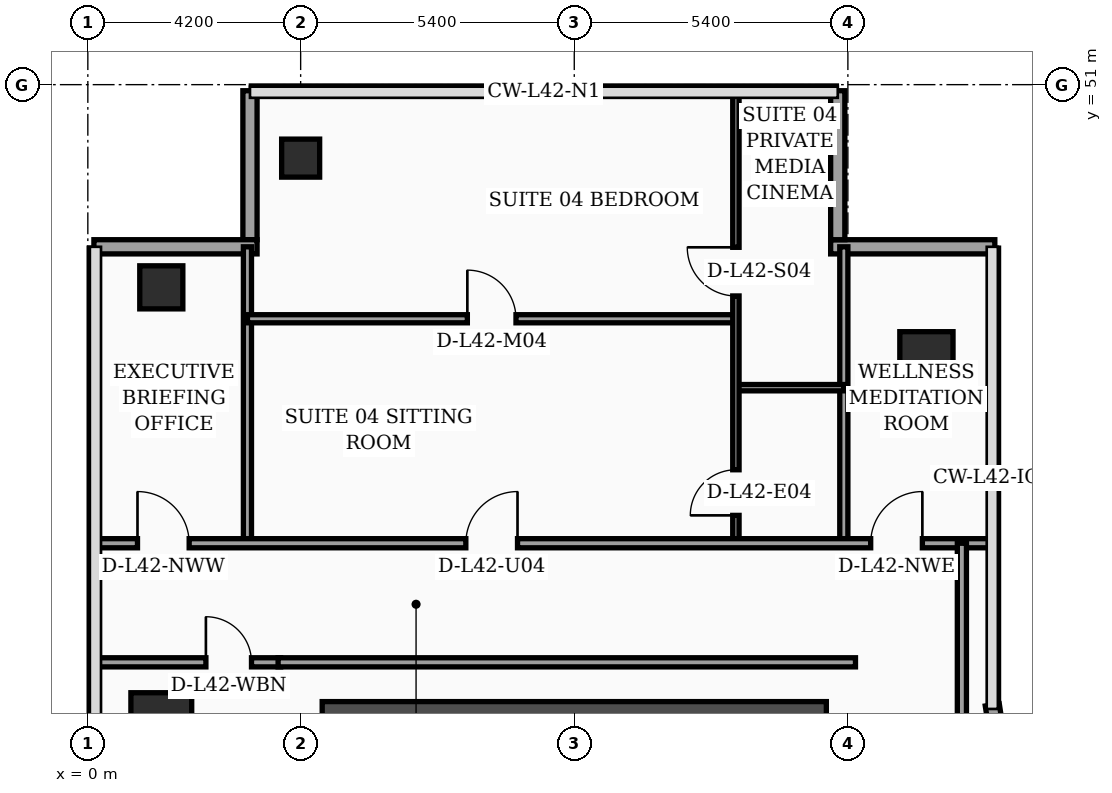
"""IFC4 building model, lengths in metres.
Left out: names, types, materials, properties, quantities, classifications, styles, units other than length and angle.
Written with IfcOpenShell. Run it as: python <this file> out.ifc"""

import sys

from ifc_helpers import new_model, si_unit, direction, frame, frame_2d, origin, origin_2d, place, context, subcontext, project, spatial, rectangle, hollow_rectangle, extrude, element, fill, save


model = new_model("IFC4")
c1 = context("Model", 3, precision=1e-05, world=origin(), true_north=direction((0.0, 1.0)))
c2 = subcontext(c1, "Body", "Model", "MODEL_VIEW")
j1 = project(units=[si_unit("LENGTHUNIT", "METRE"), si_unit("PLANEANGLEUNIT", "RADIAN")], contexts=[c1])
p1 = place(None, origin())
s1 = spatial("IfcSite", under=j1, at=p1, CompositionType="ELEMENT")
p2 = place(p1, origin())
s2 = spatial("IfcBuilding", under=s1, at=p2, CompositionType="ELEMENT")
p3 = place(p2, frame((0.0, 0.0, 171.3)))
s3 = spatial("IfcBuildingStorey", under=s2, at=p3, CompositionType="ELEMENT", Elevation=171.3)
p4 = place(p3, frame((4.625, 38.4, 0.0), z_axis=(0.0, 0.0, 1.0), x_axis=(1.0, 0.0, 0.0)))
e1 = element("IfcWall", 1, at=p4, inside=s3, PredefinedType="SHEAR", context=c2, shape_type="SweptSolid", body=[
    extrude(rectangle(XDim=9.95, YDim=0.85, at=frame_2d((4.975, 0.0))), origin(), (0.0, 0.0, 1.0), 3.56),
])
p5 = place(p3, frame((1.45, 38.4, 0.0), z_axis=(0.0, 0.0, 1.0), x_axis=(1.0, 0.0, 0.0)))
e2 = element("IfcColumn", 2, at=p5, inside=s3, PredefinedType="COLUMN", context=c2, shape_type="SweptSolid", body=[
    extrude(rectangle(XDim=1.2, YDim=1.2, at=origin_2d()), origin(), (0.0, 0.0, 1.0), 3.56),
])
p6 = place(p3, frame((1.45, 47.0, 0.0), z_axis=(0.0, 0.0, 1.0), x_axis=(1.0, 0.0, 0.0)))
e3 = element("IfcColumn", 3, at=p6, inside=s3, PredefinedType="COLUMN", context=c2, shape_type="SweptSolid", body=[
    extrude(hollow_rectangle(XDim=0.85, YDim=0.85, WallThickness=0.036, at=origin_2d()), origin(), (0.0, 0.0, 1.0), 3.56),
])
p7 = place(p3, frame((4.2, 49.55, 0.0), z_axis=(0.0, 0.0, 1.0), x_axis=(1.0, 0.0, 0.0)))
e4 = element("IfcColumn", 4, at=p7, inside=s3, PredefinedType="COLUMN", context=c2, shape_type="SweptSolid", body=[
    extrude(hollow_rectangle(XDim=0.75, YDim=0.75, WallThickness=0.032, at=origin_2d()), origin(), (0.0, 0.0, 1.0), 3.56),
])
p8 = place(p3, frame((16.55, 45.6, 0.0), z_axis=(0.0, 0.0, 1.0), x_axis=(1.0, 0.0, 0.0)))
e5 = element("IfcColumn", 5, at=p8, inside=s3, PredefinedType="COLUMN", context=c2, shape_type="SweptSolid", body=[
    extrude(rectangle(XDim=1.05, YDim=1.05, at=origin_2d()), origin(), (0.0, 0.0, 1.0), 3.56),
])
p9 = place(p3, frame((17.962, 38.03, 0.0), z_axis=(0.0, 0.0, 1.0), x_axis=(-0.15141125477, 0.988470855377, 0.0)))
e6 = element("IfcWall", 6, at=p9, inside=s3, PredefinedType="SOLIDWALL", context=c2, shape_type="SweptSolid", body=[
    extrude(rectangle(XDim=0.739, YDim=0.28, at=frame_2d((0.369, 0.0))), origin(), (0.0, 0.0, 1.0), 3.56),
])
p10 = place(p3, frame((17.9, 47.8, 0.0), z_axis=(0.0, 0.0, 1.0), x_axis=(-1.0, 0.0, 0.0)))
e7 = element("IfcWall", 7, at=p10, inside=s3, PredefinedType="SOLIDWALL", context=c2, shape_type="SweptSolid", body=[
    extrude(rectangle(XDim=3.24, YDim=0.28, at=frame_2d((1.62, 0.0))), origin(), (0.0, 0.0, 1.0), 3.56),
])
p11 = place(p3, frame((14.8, 47.94, 0.0), z_axis=(0.0, 0.0, 1.0), x_axis=(0.0, 1.0, 0.0)))
e8 = element("IfcWall", 8, at=p11, inside=s3, PredefinedType="SOLIDWALL", context=c2, shape_type="SweptSolid", body=[
    extrude(rectangle(XDim=2.94, YDim=0.28, at=frame_2d((1.47, 0.0))), origin(), (0.0, 0.0, 1.0), 3.56),
])
p12 = place(p3, frame((3.2, 50.88, 0.0), z_axis=(0.0, 0.0, 1.0), x_axis=(0.0, -1.0, 0.0)))
e9 = element("IfcWall", 9, at=p12, inside=s3, PredefinedType="SOLIDWALL", context=c2, shape_type="SweptSolid", body=[
    extrude(rectangle(XDim=2.94, YDim=0.28, at=frame_2d((1.47, 0.0))), origin(), (0.0, 0.0, 1.0), 3.04),
])
p13 = place(p3, frame((3.34, 47.8, 0.0), z_axis=(0.0, 0.0, 1.0), x_axis=(-1.0, 0.0, 0.0)))
e10 = element("IfcWall", 10, at=p13, inside=s3, PredefinedType="SOLIDWALL", context=c2, shape_type="SweptSolid", body=[
    extrude(rectangle(XDim=3.22, YDim=0.28, at=frame_2d((1.61, 0.0))), origin(), (0.0, 0.0, 1.0), 3.04),
])
p14 = place(p3, frame((0.08, 39.6, 0.0), z_axis=(0.0, 0.0, 1.0), x_axis=(1.0, 0.0, 0.0)))
e11 = element("IfcWall", 11, at=p14, inside=s3, PredefinedType="PARTITIONING", context=c2, shape_type="SweptSolid", body=[
    extrude(rectangle(XDim=3.725, YDim=0.18, at=frame_2d((1.862, 0.0))), origin(), (0.0, 0.0, 1.0), 2.94),
])
p15 = place(p14, frame((2.25, 0.0, 0.0)))
e12 = element("IfcOpeningElement", 12, at=p15, cuts=e11, PredefinedType="OPENING", context=c2, shape_type="SweptSolid", body=[
    extrude(rectangle(XDim=0.9, YDim=2.15, at=frame_2d((0.45, 1.075))), frame((0.0, 0.1, 0.0), z_axis=(0.0, -1.0, 0.0), x_axis=(1.0, 0.0, 0.0)), (0.0, 0.0, 1.0), 0.2),
])
p16 = place(p3, frame((3.15, 41.95, 0.0), z_axis=(0.0, 0.0, 1.0), x_axis=(0.0, 1.0, 0.0)))
e13 = element("IfcWall", 13, at=p16, inside=s3, PredefinedType="PARTITIONING", context=c2, shape_type="SweptSolid", body=[
    extrude(rectangle(XDim=5.85, YDim=0.16, at=frame_2d((2.925, 0.0))), origin(), (0.0, 0.0, 1.0), 3.14),
])
p17 = place(p3, frame((14.92, 41.95, 0.0), z_axis=(0.0, 0.0, 1.0), x_axis=(0.0, 1.0, 0.0)))
e14 = element("IfcWall", 14, at=p17, inside=s3, PredefinedType="PARTITIONING", context=c2, shape_type="SweptSolid", body=[
    extrude(rectangle(XDim=5.85, YDim=0.16, at=frame_2d((2.925, 0.0))), origin(), (0.0, 0.0, 1.0), 3.04),
])
p18 = place(p3, frame((12.79, 45.02, 0.0), z_axis=(0.0, 0.0, 1.0), x_axis=(1.0, 0.0, 0.0)))
e15 = element("IfcWall", 15, at=p18, inside=s3, PredefinedType="PARTITIONING", context=c2, shape_type="SweptSolid", body=[
    extrude(rectangle(XDim=2.13, YDim=0.125, at=frame_2d((1.065, 0.0))), origin(), (0.0, 0.0, 1.0), 3.56),
])
p19 = place(p3, frame((3.15, 46.38, 0.0), z_axis=(0.0, 0.0, 1.0), x_axis=(1.0, 0.0, 0.0)))
e16 = element("IfcWall", 16, at=p19, inside=s3, PredefinedType="PARTITIONING", context=c2, shape_type="SweptSolid", body=[
    extrude(rectangle(XDim=9.64, YDim=0.16, at=frame_2d((4.82, 0.0))), origin(), (0.0, 0.0, 1.0), 2.94),
])
p20 = place(p19, frame((4.34, 0.0, 0.0)))
e17 = element("IfcOpeningElement", 17, at=p20, cuts=e16, PredefinedType="OPENING", context=c2, shape_type="SweptSolid", body=[
    extrude(rectangle(XDim=0.96, YDim=2.2, at=frame_2d((0.48, 1.1))), frame((0.0, 0.09, 0.0), z_axis=(0.0, -1.0, 0.0), x_axis=(1.0, 0.0, 0.0)), (0.0, 0.0, 1.0), 0.18),
])
p21 = place(p3, frame((12.79, 41.95, 0.0), z_axis=(0.0, 0.0, 1.0), x_axis=(0.0, 1.0, 0.0)))
e18 = element("IfcWall", 18, at=p21, inside=s3, PredefinedType="PARTITIONING", context=c2, shape_type="SweptSolid", body=[
    extrude(rectangle(XDim=8.99, YDim=0.125, at=frame_2d((4.495, 0.0))), origin(), (0.0, 0.0, 1.0), 3.04),
])
p22 = place(p21, frame((0.55, 0.0, 0.0)))
e19 = element("IfcOpeningElement", 19, at=p22, cuts=e18, PredefinedType="OPENING", context=c2, shape_type="SweptSolid", body=[
    extrude(rectangle(XDim=0.9, YDim=2.15, at=frame_2d((0.45, 1.075))), frame((0.0, 0.073, 0.0), z_axis=(0.0, -1.0, 0.0), x_axis=(1.0, 0.0, 0.0)), (0.0, 0.0, 1.0), 0.145),
])
p23 = place(p21, frame((4.88, 0.0, 0.0)))
e20 = element("IfcOpeningElement", 20, at=p23, cuts=e18, PredefinedType="OPENING", context=c2, shape_type="SweptSolid", body=[
    extrude(rectangle(XDim=0.96, YDim=2.2, at=frame_2d((0.48, 1.1))), frame((0.0, 0.073, 0.0), z_axis=(0.0, -1.0, 0.0), x_axis=(1.0, 0.0, 0.0)), (0.0, 0.0, 1.0), 0.145),
])
p24 = place(p3, frame((0.08, 41.95, 0.0), z_axis=(0.0, 0.0, 1.0), x_axis=(1.0, 0.0, 0.0)))
e21 = element("IfcWall", 21, at=p24, inside=s3, PredefinedType="PARTITIONING", context=c2, shape_type="SweptSolid", body=[
    extrude(rectangle(XDim=17.77, YDim=0.18, at=frame_2d((8.885, 0.0))), origin(), (0.0, 0.0, 1.0), 2.94),
])
p25 = place(p24, frame((0.9, 0.0, 0.0)))
e22 = element("IfcOpeningElement", 22, at=p25, cuts=e21, PredefinedType="OPENING", context=c2, shape_type="SweptSolid", body=[
    extrude(rectangle(XDim=1.02, YDim=2.2, at=frame_2d((0.51, 1.1))), frame((0.0, 0.1, 0.0), z_axis=(0.0, -1.0, 0.0), x_axis=(1.0, 0.0, 0.0)), (0.0, 0.0, 1.0), 0.2),
])
p26 = place(p24, frame((7.38, 0.0, 0.0)))
e23 = element("IfcOpeningElement", 23, at=p26, cuts=e21, PredefinedType="OPENING", context=c2, shape_type="SweptSolid", body=[
    extrude(rectangle(XDim=1.02, YDim=2.2, at=frame_2d((0.51, 1.1))), frame((0.0, 0.1, 0.0), z_axis=(0.0, -1.0, 0.0), x_axis=(1.0, 0.0, 0.0)), (0.0, 0.0, 1.0), 0.2),
])
p27 = place(p24, frame((15.37, 0.0, 0.0)))
e24 = element("IfcOpeningElement", 24, at=p27, cuts=e21, PredefinedType="OPENING", context=c2, shape_type="SweptSolid", body=[
    extrude(rectangle(XDim=1.02, YDim=2.2, at=frame_2d((0.51, 1.1))), frame((0.0, 0.1, 0.0), z_axis=(0.0, -1.0, 0.0), x_axis=(1.0, 0.0, 0.0)), (0.0, 0.0, 1.0), 0.2),
])
p28 = place(p3, frame((17.25, 24.3, 0.0), z_axis=(0.0, 0.0, 1.0), x_axis=(0.0, 1.0, 0.0)))
e25 = element("IfcWall", 25, at=p28, inside=s3, PredefinedType="PARTITIONING", context=c2, shape_type="SweptSolid", body=[
    extrude(rectangle(XDim=17.65, YDim=0.18, at=frame_2d((8.825, 0.0))), origin(), (0.0, 0.0, 1.0), 2.94),
])
p29 = place(p3, frame((3.755, 39.6, 0.0), z_axis=(0.0, 0.0, 1.0), x_axis=(1.0, 0.0, 0.0)))
e26 = element("IfcWall", 26, at=p29, inside=s3, PredefinedType="PARTITIONING", context=c2, shape_type="SweptSolid", body=[
    extrude(rectangle(XDim=11.395, YDim=0.18, at=frame_2d((5.698, 0.0))), origin(), (0.0, 0.0, 1.0), 2.94),
])
p30 = place(p15, origin())
e27 = element("IfcDoor", 27, at=p30, inside=s3, OperationType="SINGLE_SWING_LEFT", PredefinedType="DOOR", context=c2, shape_type="SweptSolid", body=[
    extrude(rectangle(XDim=0.9, YDim=2.15, at=frame_2d((0.45, 1.075))), frame((0.0, 0.025, 0.0), z_axis=(0.0, -1.0, 0.0), x_axis=(1.0, 0.0, 0.0)), (0.0, 0.0, 1.0), 0.05),
])
fill(e12, e27)
p31 = place(p20, origin())
e28 = element("IfcDoor", 28, at=p31, inside=s3, OperationType="SINGLE_SWING_LEFT", PredefinedType="DOOR", context=c2, shape_type="SweptSolid", body=[
    extrude(rectangle(XDim=0.96, YDim=2.2, at=frame_2d((0.48, 1.1))), frame((0.0, 0.025, 0.0), z_axis=(0.0, -1.0, 0.0), x_axis=(1.0, 0.0, 0.0)), (0.0, 0.0, 1.0), 0.05),
])
fill(e17, e28)
p32 = place(p22, origin())
e29 = element("IfcDoor", 29, at=p32, inside=s3, OperationType="SINGLE_SWING_LEFT", PredefinedType="DOOR", context=c2, shape_type="SweptSolid", body=[
    extrude(rectangle(XDim=0.9, YDim=2.15, at=frame_2d((0.45, 1.075))), frame((0.0, 0.025, 0.0), z_axis=(0.0, -1.0, 0.0), x_axis=(1.0, 0.0, 0.0)), (0.0, 0.0, 1.0), 0.05),
])
fill(e19, e29)
p33 = place(p23, origin())
e30 = element("IfcDoor", 30, at=p33, inside=s3, OperationType="SINGLE_SWING_RIGHT", PredefinedType="DOOR", context=c2, shape_type="SweptSolid", body=[
    extrude(rectangle(XDim=0.96, YDim=2.2, at=frame_2d((0.48, 1.1))), frame((0.0, 0.025, 0.0), z_axis=(0.0, -1.0, 0.0), x_axis=(1.0, 0.0, 0.0)), (0.0, 0.0, 1.0), 0.05),
])
fill(e20, e30)
p34 = place(p25, origin())
e31 = element("IfcDoor", 31, at=p34, inside=s3, OperationType="SINGLE_SWING_LEFT", PredefinedType="DOOR", context=c2, shape_type="SweptSolid", body=[
    extrude(rectangle(XDim=1.02, YDim=2.2, at=frame_2d((0.51, 1.1))), frame((0.0, 0.025, 0.0), z_axis=(0.0, -1.0, 0.0), x_axis=(1.0, 0.0, 0.0)), (0.0, 0.0, 1.0), 0.05),
])
fill(e22, e31)
p35 = place(p26, origin())
e32 = element("IfcDoor", 32, at=p35, inside=s3, OperationType="SINGLE_SWING_RIGHT", PredefinedType="DOOR", context=c2, shape_type="SweptSolid", body=[
    extrude(rectangle(XDim=1.02, YDim=2.2, at=frame_2d((0.51, 1.1))), frame((0.0, 0.025, 0.0), z_axis=(0.0, -1.0, 0.0), x_axis=(1.0, 0.0, 0.0)), (0.0, 0.0, 1.0), 0.05),
])
fill(e23, e32)
p36 = place(p27, origin())
e33 = element("IfcDoor", 33, at=p36, inside=s3, OperationType="SINGLE_SWING_RIGHT", PredefinedType="DOOR", context=c2, shape_type="SweptSolid", body=[
    extrude(rectangle(XDim=1.02, YDim=2.2, at=frame_2d((0.51, 1.1))), frame((0.0, 0.025, 0.0), z_axis=(0.0, -1.0, 0.0), x_axis=(1.0, 0.0, 0.0)), (0.0, 0.0, 1.0), 0.05),
])
fill(e24, e33)
save(model, sys.argv[1])
